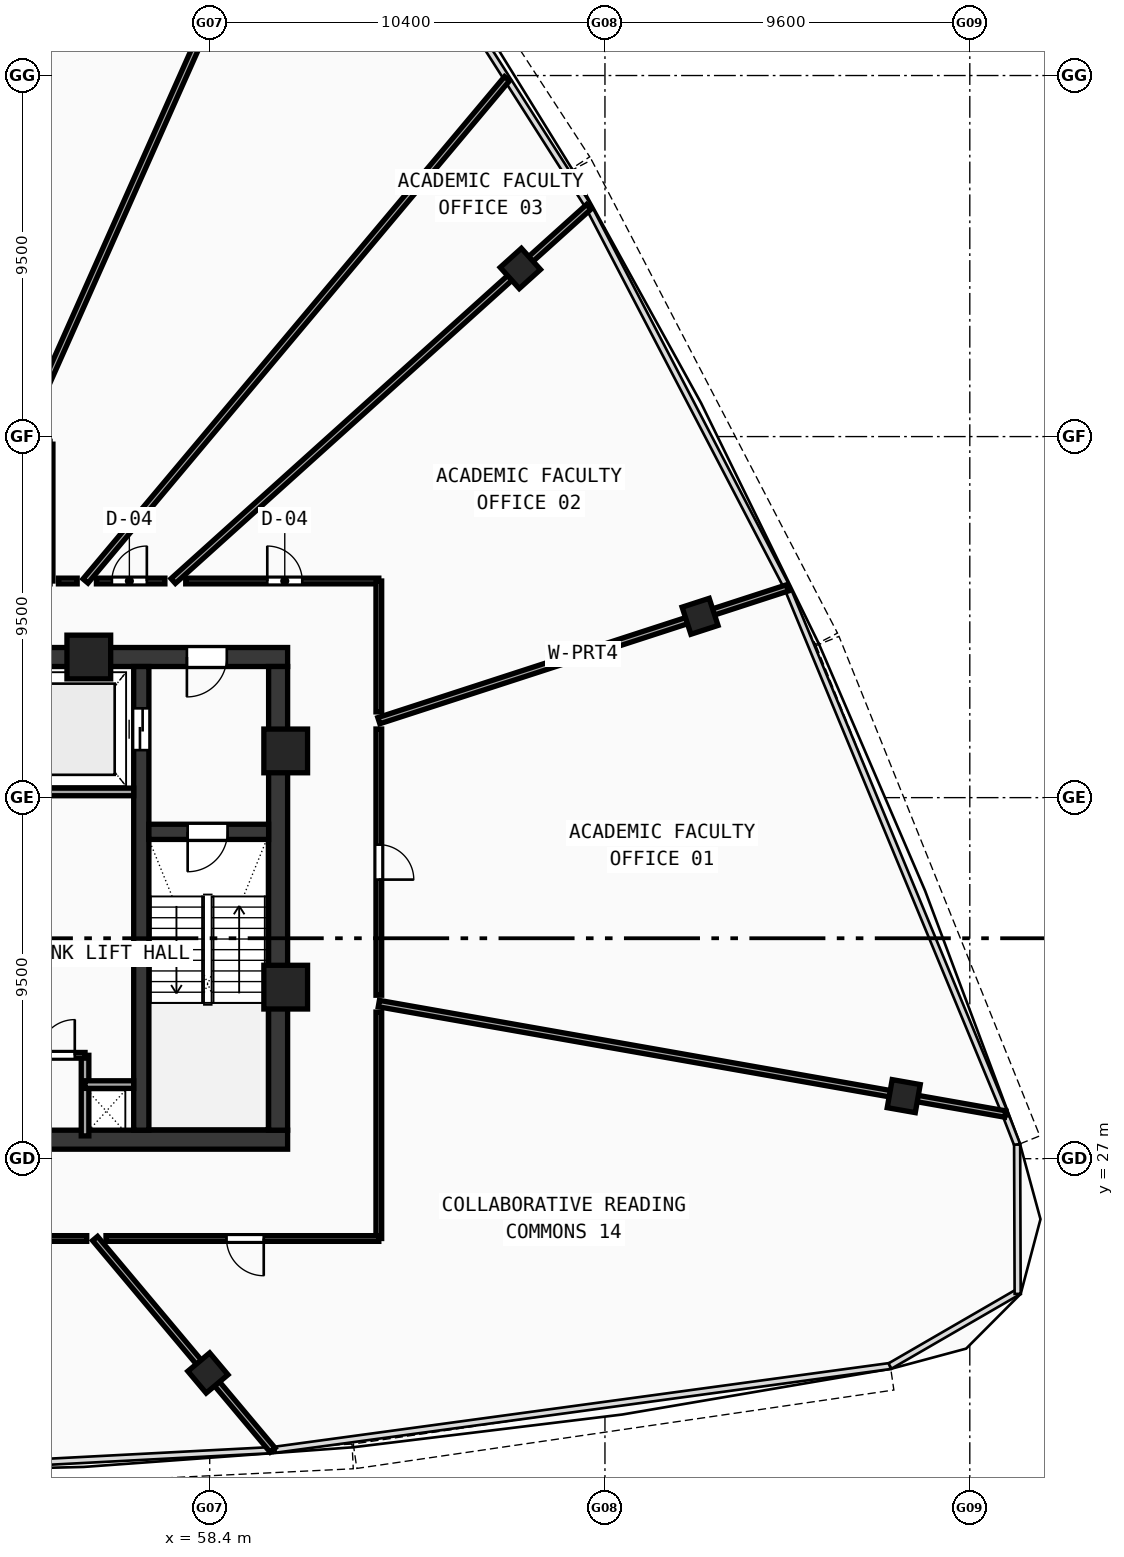
"""IFC4 building model, lengths in metres.
Left out: names, types, materials, properties, quantities, classifications, styles, units other than length and angle.
Written with IfcOpenShell. Run it as: python <this file> out.ifc"""

import sys

from ifc_helpers import new_model, si_unit, direction, frame, frame_2d, origin, origin_with_axes, origin_2d, place, context, subcontext, project, spatial, rectangle, hollow_rectangle, extrude, source, transform, mapped, element, fill, save


model = new_model("IFC4")
c1 = context("Model", 3, precision=1e-05, world=origin(), true_north=direction((0.0, 1.0)))
c2 = subcontext(c1, "Body", "Model", "MODEL_VIEW")
j1 = project(units=[si_unit("LENGTHUNIT", "METRE"), si_unit("PLANEANGLEUNIT", "RADIAN")], contexts=[c1])
p1 = place(None, origin())
s1 = spatial("IfcSite", under=j1, at=p1, CompositionType="ELEMENT")
p2 = place(p1, origin())
s2 = spatial("IfcBuilding", under=s1, at=p2, CompositionType="ELEMENT")
p3 = place(p2, frame((0.0, 0.0, 296.21)))
s3 = spatial("IfcBuildingStorey", under=s2, at=p3, CompositionType="ELEMENT", Elevation=296.21)
p4 = place(p3, frame((35.55, 27.5, 0.0), z_axis=(0.0, 0.0, 1.0), x_axis=(1.0, 0.0, 0.0)))
e1 = element("IfcWall", 1, at=p4, inside=s3, PredefinedType="SHEAR", context=c2, shape_type="SweptSolid", body=[
    extrude(rectangle(XDim=24.9, YDim=0.5, at=frame_2d((12.45, 0.0))), origin(), (0.0, 0.0, 1.0), 3.47),
])
p5 = place(p3, frame((49.2, 40.2, 0.0), z_axis=(0.0, 0.0, 1.0), x_axis=(1.0, 0.0, 0.0)))
e2 = element("IfcWall", 2, at=p5, inside=s3, PredefinedType="SHEAR", context=c2, shape_type="SweptSolid", body=[
    extrude(rectangle(XDim=11.25, YDim=0.5, at=frame_2d((5.625, 0.0))), origin(), (0.0, 0.0, 1.0), 3.47),
])
p6 = place(p5, frame((8.6, 0.0, 0.0)))
e3 = element("IfcOpeningElement", 3, at=p6, cuts=e2, PredefinedType="OPENING", context=c2, shape_type="SweptSolid", body=[
    extrude(rectangle(XDim=1.05, YDim=2.1, at=frame_2d((0.525, 1.05))), frame((0.0, 0.26, 0.0), z_axis=(0.0, -1.0, 0.0), x_axis=(1.0, 0.0, 0.0)), (0.0, 0.0, 1.0), 0.52),
])
p7 = place(p3, frame((60.2, 27.75, 0.0), z_axis=(0.0, 0.0, 1.0), x_axis=(0.0, 1.0, 0.0)))
e4 = element("IfcWall", 4, at=p7, inside=s3, PredefinedType="SHEAR", context=c2, shape_type="SweptSolid", body=[
    extrude(rectangle(XDim=12.2, YDim=0.5, at=frame_2d((6.1, 0.0))), origin(), (0.0, 0.0, 1.0), 3.47),
])
p8 = place(p3, frame((56.6, 27.75, 0.0), z_axis=(0.0, 0.0, 1.0), x_axis=(0.0, 1.0, 0.0)))
e5 = element("IfcWall", 5, at=p8, inside=s3, PredefinedType="SHEAR", context=c2, shape_type="SweptSolid", body=[
    extrude(rectangle(XDim=12.2, YDim=0.4, at=frame_2d((6.1, 0.0))), origin(), (0.0, 0.0, 1.0), 3.47),
])
p9 = place(p8, frame((10.0, 0.0, 0.0)))
e6 = element("IfcOpeningElement", 6, at=p9, cuts=e5, PredefinedType="OPENING", context=c2, shape_type="SweptSolid", body=[
    extrude(rectangle(XDim=1.1, YDim=2.1, at=frame_2d((0.55, 1.05))), frame((0.0, 0.21, 0.0), z_axis=(0.0, -1.0, 0.0), x_axis=(1.0, 0.0, 0.0)), (0.0, 0.0, 1.0), 0.42),
])
p10 = place(p3, frame((56.8, 35.6, 0.0), z_axis=(0.0, 0.0, 1.0), x_axis=(1.0, 0.0, 0.0)))
e7 = element("IfcWall", 7, at=p10, inside=s3, PredefinedType="SHEAR", context=c2, shape_type="SweptSolid", body=[
    extrude(rectangle(XDim=3.15, YDim=0.4, at=frame_2d((1.575, 0.0))), origin(), (0.0, 0.0, 1.0), 3.47),
])
p11 = place(p10, frame((1.02, 0.0, 0.0)))
e8 = element("IfcOpeningElement", 8, at=p11, cuts=e7, PredefinedType="OPENING", context=c2, shape_type="SweptSolid", body=[
    extrude(rectangle(XDim=1.05, YDim=2.1, at=frame_2d((0.525, 1.05))), frame((0.0, 0.21, 0.0), z_axis=(0.0, -1.0, 0.0), x_axis=(1.0, 0.0, 0.0)), (0.0, 0.0, 1.0), 0.42),
])
m1 = source(origin(), c2, "Body", "SweptSolid", [
    extrude(hollow_rectangle(XDim=1.15, YDim=1.15, WallThickness=0.048, at=origin_2d()), origin(), (0.0, 0.0, 1.0), 3.73),
])
for number, where, z_axis, x_axis in (
    (9, (60.4, 31.513, -0.26), (0.0, 0.0, 1.0), (1.0, 0.0, 0.0)),
    (10, (60.4, 37.729, -0.26), (0.0, 0.0, 1.0), (1.0, 0.0, 0.0)),
    (11, (55.219, 40.2, -0.26), (0.0, 0.0, 1.0), (1.0, 0.0, 0.0)),
):
    element("IfcColumn", number, at=place(p3, frame(where, z_axis=z_axis, x_axis=x_axis)), inside=s3, PredefinedType="COLUMN", context=c2, shape_type="MappedRepresentation", body=[
        mapped(m1, transform((0.0, 0.0, 0.0), scale=1.0)),
    ])
m2 = source(origin(), c2, "Body", "SweptSolid", [
    extrude(hollow_rectangle(XDim=0.75, YDim=0.75, WallThickness=0.028, at=origin_2d()), origin(), (0.0, 0.0, 1.0), 3.73),
])
for number, where, z_axis, x_axis in (
    (12, (58.354, 21.362, -0.26), (0.0, 0.0, 1.0), (0.766, 0.643, 0.0)),
    (13, (76.662, 28.646, -0.26), (0.0, 0.0, 1.0), (0.174, 0.985, 0.0)),
    (14, (71.302, 41.271, -0.26), (0.0, 0.0, 1.0), (-0.309, 0.951, 0.0)),
    (15, (66.573, 50.424, -0.26), (0.0, 0.0, 1.0), (-0.669, 0.743, 0.0)),
):
    element("IfcColumn", number, at=place(p3, frame(where, z_axis=z_axis, x_axis=x_axis)), inside=s3, PredefinedType="COLUMN", context=c2, shape_type="MappedRepresentation", body=[
        mapped(m2, transform((0.0, 0.0, 0.0), scale=1.0)),
    ])
p12 = place(p3, frame((53.68, 36.65, 0.0), z_axis=(0.0, 0.0, 1.0), x_axis=(1.0, 0.0, 0.0)))
e16 = element("IfcWall", 16, at=p12, inside=s3, PredefinedType="SOLIDWALL", context=c2, shape_type="SweptSolid", body=[
    extrude(rectangle(XDim=2.72, YDim=0.2, at=frame_2d((1.36, 0.0))), origin(), (0.0, 0.0, 1.0), 3.47),
])
p13 = place(p3, frame((55.12, 27.6, 0.0), z_axis=(0.0, 0.0, 1.0), x_axis=(0.0, 1.0, 0.0)))
e17 = element("IfcWall", 17, at=p13, inside=s3, PredefinedType="SOLIDWALL", context=c2, shape_type="SweptSolid", body=[
    extrude(rectangle(XDim=2.12, YDim=0.2, at=frame_2d((1.06, 0.0))), origin(), (0.0, 0.0, 1.0), 3.47),
])
p14 = place(p3, frame((55.12, 28.95, 0.0), z_axis=(0.0, 0.0, 1.0), x_axis=(1.0, 0.0, 0.0)))
e18 = element("IfcWall", 18, at=p14, inside=s3, PredefinedType="SOLIDWALL", context=c2, shape_type="SweptSolid", body=[
    extrude(rectangle(XDim=1.28, YDim=0.2, at=frame_2d((0.64, 0.0))), origin(), (0.0, 0.0, 1.0), 3.47),
])
p15 = place(p3, frame((51.05, 29.72, 0.0), z_axis=(0.0, 0.0, 1.0), x_axis=(1.0, 0.0, 0.0)))
e19 = element("IfcWall", 19, at=p15, inside=s3, PredefinedType="PARTITIONING", context=c2, shape_type="SweptSolid", body=[
    extrude(rectangle(XDim=4.07, YDim=0.15, at=frame_2d((2.035, 0.0))), origin(), (0.0, 0.0, 1.0), 3.47),
])
p16 = place(p15, frame((0.3, 0.0, 0.0)))
e20 = element("IfcOpeningElement", 20, at=p16, cuts=e19, PredefinedType="OPENING", context=c2, shape_type="SweptSolid", body=[
    extrude(rectangle(XDim=0.9, YDim=2.1, at=frame_2d((0.45, 1.05))), frame((0.0, 0.085, 0.0), z_axis=(0.0, -1.0, 0.0), x_axis=(1.0, 0.0, 0.0)), (0.0, 0.0, 1.0), 0.17),
])
p17 = place(p15, frame((2.86, 0.0, 0.0)))
e21 = element("IfcOpeningElement", 21, at=p17, cuts=e19, PredefinedType="OPENING", context=c2, shape_type="SweptSolid", body=[
    extrude(rectangle(XDim=0.94, YDim=2.1, at=frame_2d((0.47, 1.05))), frame((0.0, 0.085, 0.0), z_axis=(0.0, -1.0, 0.0), x_axis=(1.0, 0.0, 0.0)), (0.0, 0.0, 1.0), 0.17),
])
p18 = place(p3, frame((54.2, 42.2, 0.0), z_axis=(0.0, 0.0, 1.0), x_axis=(0.0, 1.0, 0.0)))
e22 = element("IfcWall", 22, at=p18, inside=s3, PredefinedType="PARTITIONING", context=c2, shape_type="SweptSolid", body=[
    extrude(rectangle(XDim=3.6, YDim=0.15, at=frame_2d((1.8, 0.0))), origin(), (0.0, 0.0, 1.0), 3.47),
])
p19 = place(p3, frame((62.85, 38.525, 0.0), z_axis=(0.0, 0.0, 1.0), x_axis=(0.951060099206, 0.309005967092, 0.0)))
e23 = element("IfcWall", 23, at=p19, inside=s3, PredefinedType="PARTITIONING", context=c2, shape_type="SweptSolid", body=[
    extrude(rectangle(XDim=11.302, YDim=0.17, at=frame_2d((5.651, 0.0))), origin(), (0.0, 0.0, 1.0), 2.87),
])
p20 = place(p3, frame((57.44, 42.2, 0.0), z_axis=(0.0, 0.0, 1.0), x_axis=(0.743145593795, 0.669129753055, 0.0)))
e24 = element("IfcWall", 24, at=p20, inside=s3, PredefinedType="PARTITIONING", context=c2, shape_type="SweptSolid", body=[
    extrude(rectangle(XDim=14.711, YDim=0.17, at=frame_2d((7.355, 0.0))), origin(), (0.0, 0.0, 1.0), 2.87),
])
p21 = place(p3, frame((55.132, 42.2, 0.0), z_axis=(0.0, 0.0, 1.0), x_axis=(0.642779182264, 0.766051514487, 0.0)))
e25 = element("IfcWall", 25, at=p21, inside=s3, PredefinedType="PARTITIONING", context=c2, shape_type="SweptSolid", body=[
    extrude(rectangle(XDim=17.254, YDim=0.17, at=frame_2d((8.627, 0.0))), origin(), (0.0, 0.0, 1.0), 2.87),
])
p22 = place(p3, frame((53.387, 45.8, 0.0), z_axis=(0.0, 0.0, 1.0), x_axis=(0.406740781751, 0.913543614975, 0.0)))
e26 = element("IfcWall", 26, at=p22, inside=s3, PredefinedType="PARTITIONING", context=c2, shape_type="SweptSolid", body=[
    extrude(rectangle(XDim=19.177, YDim=0.17, at=frame_2d((9.589, 0.0))), origin(), (0.0, 0.0, 1.0), 2.87),
])
p23 = place(p3, frame((55.384, 24.9, 0.0), z_axis=(0.0, 0.0, 1.0), x_axis=(0.642798027821, -0.766035701146, 0.0)))
e27 = element("IfcWall", 27, at=p23, inside=s3, PredefinedType="PARTITIONING", context=c2, shape_type="SweptSolid", body=[
    extrude(rectangle(XDim=7.267, YDim=0.17, at=frame_2d((3.633, 0.0))), origin(), (0.0, 0.0, 1.0), 2.87),
])
p24 = place(p3, frame((62.85, 31.082, 0.0), z_axis=(0.0, 0.0, 1.0), x_axis=(0.984806900178, -0.173653014261, 0.0)))
e28 = element("IfcWall", 28, at=p24, inside=s3, PredefinedType="PARTITIONING", context=c2, shape_type="SweptSolid", body=[
    extrude(rectangle(XDim=16.736, YDim=0.17, at=frame_2d((8.368, 0.0))), origin(), (0.0, 0.0, 1.0), 2.87),
])
p25 = place(p3, frame((54.42, 42.2, 0.0), z_axis=(0.0, 0.0, 1.0), x_axis=(1.0, 0.0, 0.0)))
e29 = element("IfcWall", 29, at=p25, inside=s3, PredefinedType="PARTITIONING", context=c2, shape_type="SweptSolid", body=[
    extrude(rectangle(XDim=0.492, YDim=0.15, at=frame_2d((0.246, 0.0))), origin(), (0.0, 0.0, 1.0), 3.47),
])
p26 = place(p3, frame((55.419, 42.2, 0.0), z_axis=(0.0, 0.0, 1.0), x_axis=(1.0, 0.0, 0.0)))
e30 = element("IfcWall", 30, at=p26, inside=s3, PredefinedType="PARTITIONING", context=c2, shape_type="SweptSolid", body=[
    extrude(rectangle(XDim=1.801, YDim=0.15, at=frame_2d((0.9, 0.0))), origin(), (0.0, 0.0, 1.0), 2.87),
])
p27 = place(p26, frame((0.407, 0.0, 0.0)))
e31 = element("IfcOpeningElement", 31, at=p27, cuts=e30, PredefinedType="OPENING", context=c2, shape_type="SweptSolid", body=[
    extrude(rectangle(XDim=0.92, YDim=2.1, at=frame_2d((0.46, 1.05))), frame((0.0, 0.085, 0.0), z_axis=(0.0, -1.0, 0.0), x_axis=(1.0, 0.0, 0.0)), (0.0, 0.0, 1.0), 0.17),
])
p28 = place(p3, frame((57.769, 42.2, 0.0), z_axis=(0.0, 0.0, 1.0), x_axis=(1.0, 0.0, 0.0)))
e32 = element("IfcWall", 32, at=p28, inside=s3, PredefinedType="PARTITIONING", context=c2, shape_type="SweptSolid", body=[
    extrude(rectangle(XDim=5.081, YDim=0.15, at=frame_2d((2.541, 0.0))), origin(), (0.0, 0.0, 1.0), 3.12),
])
p29 = place(p28, frame((2.146, 0.0, 0.0)))
e33 = element("IfcOpeningElement", 33, at=p29, cuts=e32, PredefinedType="OPENING", context=c2, shape_type="SweptSolid", body=[
    extrude(rectangle(XDim=0.92, YDim=2.1, at=frame_2d((0.46, 1.05))), frame((0.0, 0.085, 0.0), z_axis=(0.0, -1.0, 0.0), x_axis=(1.0, 0.0, 0.0)), (0.0, 0.0, 1.0), 0.17),
])
p30 = place(p3, frame((62.85, 42.2, 0.0), z_axis=(0.0, 0.0, 1.0), x_axis=(0.0, -1.0, 0.0)))
e34 = element("IfcWall", 34, at=p30, inside=s3, PredefinedType="PARTITIONING", context=c2, shape_type="SweptSolid", body=[
    extrude(rectangle(XDim=3.444, YDim=0.15, at=frame_2d((1.722, 0.0))), origin(), (0.0, 0.0, 1.0), 3.12),
])
p31 = place(p3, frame((62.85, 38.305, 0.0), z_axis=(0.0, 0.0, 1.0), x_axis=(0.0, -1.0, 0.0)))
e35 = element("IfcWall", 35, at=p31, inside=s3, PredefinedType="PARTITIONING", context=c2, shape_type="SweptSolid", body=[
    extrude(rectangle(XDim=7.004, YDim=0.15, at=frame_2d((3.502, 0.0))), origin(), (0.0, 0.0, 1.0), 3.47),
])
p32 = place(p31, frame((3.042, 0.0, 0.0)))
e36 = element("IfcOpeningElement", 36, at=p32, cuts=e35, PredefinedType="OPENING", context=c2, shape_type="SweptSolid", body=[
    extrude(rectangle(XDim=0.92, YDim=2.1, at=frame_2d((0.46, 1.05))), frame((0.0, 0.085, 0.0), z_axis=(0.0, -1.0, 0.0), x_axis=(1.0, 0.0, 0.0)), (0.0, 0.0, 1.0), 0.17),
])
p33 = place(p3, frame((62.85, 30.858, 0.0), z_axis=(0.0, 0.0, 1.0), x_axis=(0.0, -1.0, 0.0)))
e37 = element("IfcWall", 37, at=p33, inside=s3, PredefinedType="PARTITIONING", context=c2, shape_type="SweptSolid", body=[
    extrude(rectangle(XDim=5.958, YDim=0.15, at=frame_2d((2.979, 0.0))), origin(), (0.0, 0.0, 1.0), 3.12),
])
p34 = place(p3, frame((62.85, 24.9, 0.0), z_axis=(0.0, 0.0, 1.0), x_axis=(-1.0, 0.0, 0.0)))
e38 = element("IfcWall", 38, at=p34, inside=s3, PredefinedType="PARTITIONING", context=c2, shape_type="SweptSolid", body=[
    extrude(rectangle(XDim=7.179, YDim=0.15, at=frame_2d((3.589, 0.0))), origin(), (0.0, 0.0, 1.0), 3.12),
])
p35 = place(p34, frame((3.028, 0.0, 0.0)))
e39 = element("IfcOpeningElement", 39, at=p35, cuts=e38, PredefinedType="OPENING", context=c2, shape_type="SweptSolid", body=[
    extrude(rectangle(XDim=0.98, YDim=2.12, at=frame_2d((0.49, 1.06))), frame((0.0, 0.085, 0.0), z_axis=(0.0, -1.0, 0.0), x_axis=(1.0, 0.0, 0.0)), (0.0, 0.0, 1.0), 0.17),
])
p36 = place(p3, frame((55.164, 24.9, 0.0), z_axis=(0.0, 0.0, 1.0), x_axis=(-1.0, 0.0, 0.0)))
e40 = element("IfcWall", 40, at=p36, inside=s3, PredefinedType="PARTITIONING", context=c2, shape_type="SweptSolid", body=[
    extrude(rectangle(XDim=4.579, YDim=0.15, at=frame_2d((2.289, 0.0))), origin(), (0.0, 0.0, 1.0), 3.47),
])
p37 = place(p36, frame((1.818, 0.0, 0.0)))
e41 = element("IfcOpeningElement", 41, at=p37, cuts=e40, PredefinedType="OPENING", context=c2, shape_type="SweptSolid", body=[
    extrude(rectangle(XDim=0.98, YDim=2.12, at=frame_2d((0.49, 1.06))), frame((0.0, 0.085, 0.0), z_axis=(0.0, -1.0, 0.0), x_axis=(1.0, 0.0, 0.0)), (0.0, 0.0, 1.0), 0.17),
])
m3 = source(origin(), c2, "Body", "SweptSolid", [
    extrude(rectangle(XDim=1.05, YDim=2.1, at=frame_2d((0.525, 1.05))), frame((0.0, 0.025, 0.0), z_axis=(0.0, -1.0, 0.0), x_axis=(1.0, 0.0, 0.0)), (0.0, 0.0, 1.0), 0.05),
])
p38 = place(p11, frame((1.05, 0.0, 0.0), z_axis=(0.0, 0.0, 1.0), x_axis=(-1.0, 0.0, 0.0)))
e42 = element("IfcDoor", 42, at=p38, inside=s3, OperationType="SINGLE_SWING_RIGHT", PredefinedType="DOOR", context=c2, shape_type="MappedRepresentation", body=[
    mapped(m3, transform((0.0, 0.0, 0.0), scale=1.0)),
])
fill(e8, e42)
p39 = place(p6, frame((1.05, 0.0, 0.0), z_axis=(0.0, 0.0, 1.0), x_axis=(-1.0, 0.0, 0.0)))
e43 = element("IfcDoor", 43, at=p39, inside=s3, OperationType="SINGLE_SWING_RIGHT", PredefinedType="DOOR", context=c2, shape_type="MappedRepresentation", body=[
    mapped(m3, transform((0.0, 0.0, 0.0), scale=1.0)),
])
fill(e3, e43)
m4 = source(origin(), c2, "Body", "SweptSolid", [
    extrude(rectangle(XDim=1.1, YDim=2.1, at=frame_2d((0.55, 1.05))), frame((0.0, 0.025, 0.0), z_axis=(0.0, -1.0, 0.0), x_axis=(1.0, 0.0, 0.0)), (0.0, 0.0, 1.0), 0.05),
])
p40 = place(p9, origin_with_axes())
e44 = element("IfcDoor", 44, at=p40, inside=s3, OperationType="DOUBLE_DOOR_SLIDING", PredefinedType="DOOR", context=c2, shape_type="MappedRepresentation", body=[
    mapped(m4, transform((0.0, 0.0, 0.0), scale=1.0)),
])
fill(e6, e44)
m5 = source(origin(), c2, "Body", "SweptSolid", [
    extrude(rectangle(XDim=0.94, YDim=2.1, at=frame_2d((0.47, 1.05))), frame((0.0, 0.025, 0.0), z_axis=(0.0, -1.0, 0.0), x_axis=(1.0, 0.0, 0.0)), (0.0, 0.0, 1.0), 0.05),
])
p41 = place(p17, origin_with_axes())
e45 = element("IfcDoor", 45, at=p41, inside=s3, OperationType="SINGLE_SWING_RIGHT", PredefinedType="DOOR", context=c2, shape_type="MappedRepresentation", body=[
    mapped(m5, transform((0.0, 0.0, 0.0), scale=1.0)),
])
fill(e21, e45)
m6 = source(origin(), c2, "Body", "SweptSolid", [
    extrude(rectangle(XDim=0.92, YDim=2.1, at=frame_2d((0.46, 1.05))), frame((0.0, 0.025, 0.0), z_axis=(0.0, -1.0, 0.0), x_axis=(1.0, 0.0, 0.0)), (0.0, 0.0, 1.0), 0.05),
])
p42 = place(p32, origin_with_axes())
e46 = element("IfcDoor", 46, at=p42, inside=s3, OperationType="SINGLE_SWING_RIGHT", PredefinedType="DOOR", context=c2, shape_type="MappedRepresentation", body=[
    mapped(m6, transform((0.0, 0.0, 0.0), scale=1.0)),
])
fill(e36, e46)
p43 = place(p29, origin_with_axes())
e47 = element("IfcDoor", 47, at=p43, inside=s3, OperationType="SINGLE_SWING_LEFT", PredefinedType="DOOR", context=c2, shape_type="MappedRepresentation", body=[
    mapped(m6, transform((0.0, 0.0, 0.0), scale=1.0)),
])
fill(e33, e47)
p44 = place(p27, origin_with_axes())
e48 = element("IfcDoor", 48, at=p44, inside=s3, OperationType="SINGLE_SWING_RIGHT", PredefinedType="DOOR", context=c2, shape_type="MappedRepresentation", body=[
    mapped(m6, transform((0.0, 0.0, 0.0), scale=1.0)),
])
fill(e31, e48)
m7 = source(origin(), c2, "Body", "SweptSolid", [
    extrude(rectangle(XDim=0.98, YDim=2.12, at=frame_2d((0.49, 1.06))), frame((0.0, 0.025, 0.0), z_axis=(0.0, -1.0, 0.0), x_axis=(1.0, 0.0, 0.0)), (0.0, 0.0, 1.0), 0.05),
])
p45 = place(p35, origin_with_axes())
e49 = element("IfcDoor", 49, at=p45, inside=s3, OperationType="SINGLE_SWING_LEFT", PredefinedType="DOOR", context=c2, shape_type="MappedRepresentation", body=[
    mapped(m7, transform((0.0, 0.0, 0.0), scale=1.0)),
])
fill(e39, e49)
save(model, sys.argv[1])
